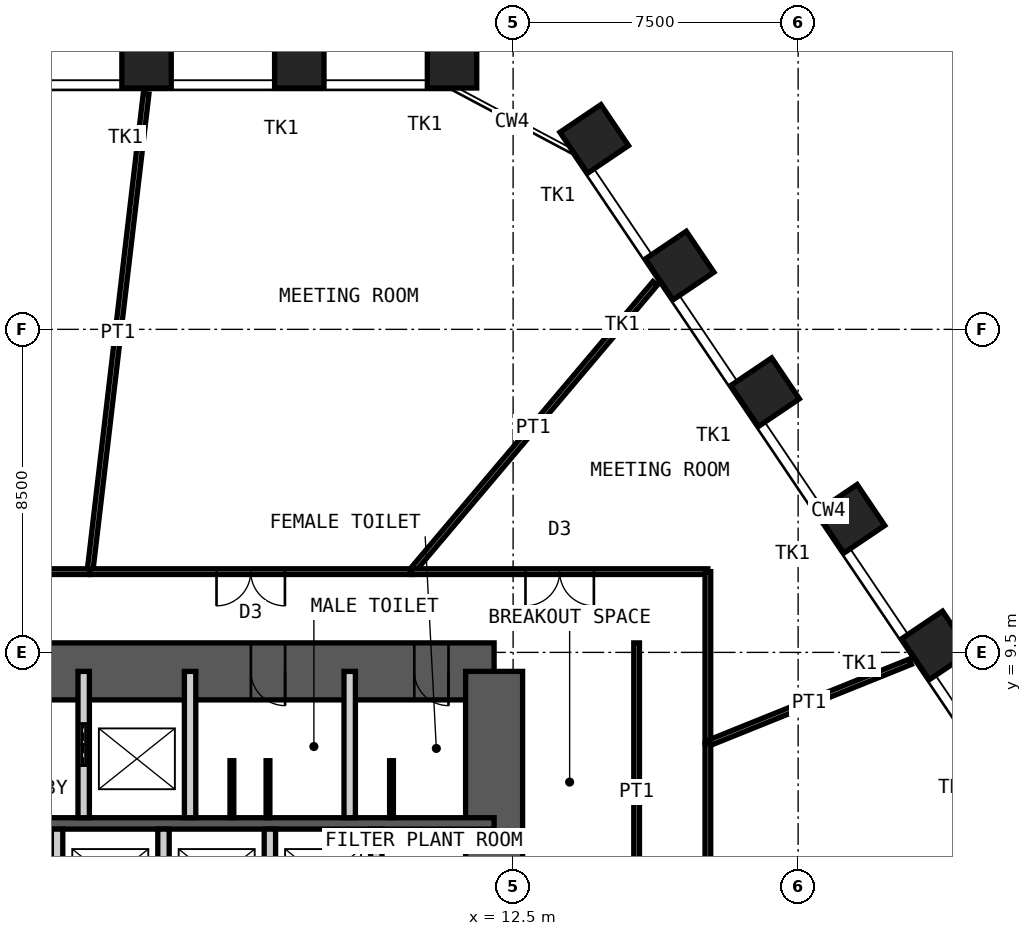
"""IFC4 building model, lengths in metres.
Left out: names, types, materials, properties, quantities, classifications, styles, units other than length and angle.
Written with IfcOpenShell. Run it as: python <this file> out.ifc"""

import sys

from ifc_helpers import new_model, si_unit, direction, frame, frame_2d, origin, origin_2d, place, context, subcontext, project, spatial, rectangle, hollow_rectangle, extrude, element, fill, save


model = new_model("IFC4")
c1 = context("Model", 3, precision=1e-05, world=origin(), true_north=direction((0.0, 1.0)))
c2 = subcontext(c1, "Body", "Model", "MODEL_VIEW")
j1 = project(units=[si_unit("LENGTHUNIT", "METRE"), si_unit("PLANEANGLEUNIT", "RADIAN")], contexts=[c1])
p1 = place(None, origin())
s1 = spatial("IfcSite", under=j1, at=p1, CompositionType="ELEMENT")
p2 = place(p1, origin())
s2 = spatial("IfcBuilding", under=s1, at=p2, CompositionType="ELEMENT")
p3 = place(p2, frame((0.0, 0.0, 170.2)))
s3 = spatial("IfcBuildingStorey", under=s2, at=p3, CompositionType="ELEMENT", Elevation=170.2)
for number, where, z_axis, x_axis in (
    (1, (2.854, 25.0, 0.0), (0.0, 0.0, 1.0), (-1.0, 0.0, 0.0)),
    (2, (6.874, 25.0, 0.0), (0.0, 0.0, 1.0), (-1.0, 0.0, 0.0)),
    (3, (10.893, 25.0, 0.0), (0.0, 0.0, 1.0), (-1.0, 0.0, 0.0)),
    (4, (14.635, 23.01, 0.0), (0.0, 0.0, 1.0), (-0.559, 0.829, 0.0)),
    (5, (16.882, 19.678, 0.0), (0.0, 0.0, 1.0), (-0.559, 0.829, 0.0)),
    (6, (19.13, 16.346, 0.0), (0.0, 0.0, 1.0), (-0.559, 0.829, 0.0)),
    (7, (21.377, 13.014, 0.0), (0.0, 0.0, 1.0), (-0.559, 0.829, 0.0)),
    (8, (23.625, 9.682, 0.0), (0.0, 0.0, 1.0), (-0.559, 0.829, 0.0)),
):
    element("IfcColumn", number, at=place(p3, frame(where, z_axis=z_axis, x_axis=x_axis)), inside=s3, PredefinedType="COLUMN", context=c2, shape_type="SweptSolid", body=[
        extrude(hollow_rectangle(XDim=1.3, YDim=1.3, WallThickness=0.1, at=origin_2d()), origin(), (0.0, 0.0, 1.0), 4.2),
    ])
p4 = place(p3, frame((-12.0, 9.0, 0.0), z_axis=(0.0, 0.0, 1.0), x_axis=(1.0, 0.0, 0.0)))
e9 = element("IfcWall", 9, at=p4, inside=s3, PredefinedType="SHEAR", context=c2, shape_type="SweptSolid", body=[
    extrude(rectangle(XDim=24.0, YDim=1.5, at=frame_2d((12.0, 0.0))), origin(), (0.0, 0.0, 1.0), 4.2),
])
p5 = place(p4, frame((10.4, 0.0, 0.0)))
e10 = element("IfcOpeningElement", 10, at=p5, cuts=e9, PredefinedType="OPENING", context=c2, shape_type="SweptSolid", body=[
    extrude(rectangle(XDim=1.0, YDim=2.1, at=frame_2d((0.5, 1.05))), frame((0.0, 0.76, 0.0), z_axis=(0.0, -1.0, 0.0), x_axis=(1.0, 0.0, 0.0)), (0.0, 0.0, 1.0), 1.52),
])
p6 = place(p4, frame((17.6, 0.0, 0.0)))
e11 = element("IfcOpeningElement", 11, at=p6, cuts=e9, PredefinedType="OPENING", context=c2, shape_type="SweptSolid", body=[
    extrude(rectangle(XDim=0.9, YDim=2.1, at=frame_2d((0.45, 1.05))), frame((0.0, 0.76, 0.0), z_axis=(0.0, -1.0, 0.0), x_axis=(1.0, 0.0, 0.0)), (0.0, 0.0, 1.0), 1.52),
])
p7 = place(p4, frame((21.9, 0.0, 0.0)))
e12 = element("IfcOpeningElement", 12, at=p7, cuts=e9, PredefinedType="OPENING", context=c2, shape_type="SweptSolid", body=[
    extrude(rectangle(XDim=0.9, YDim=2.1, at=frame_2d((0.45, 1.05))), frame((0.0, 0.76, 0.0), z_axis=(0.0, -1.0, 0.0), x_axis=(1.0, 0.0, 0.0)), (0.0, 0.0, 1.0), 1.52),
])
p8 = place(p3, frame((12.0, -9.0, 0.0), z_axis=(0.0, 0.0, 1.0), x_axis=(0.0, 1.0, 0.0)))
e13 = element("IfcWall", 13, at=p8, inside=s3, PredefinedType="SHEAR", context=c2, shape_type="SweptSolid", body=[
    extrude(rectangle(XDim=18.0, YDim=1.5, at=frame_2d((9.0, 0.0))), origin(), (0.0, 0.0, 1.0), 4.2),
])
p9 = place(p8, frame((8.1, 0.0, 0.0)))
e14 = element("IfcOpeningElement", 14, at=p9, cuts=e13, PredefinedType="OPENING", context=c2, shape_type="SweptSolid", body=[
    extrude(rectangle(XDim=1.8, YDim=2.1, at=frame_2d((0.9, 1.05))), frame((0.0, 0.76, 0.0), z_axis=(0.0, -1.0, 0.0), x_axis=(1.0, 0.0, 0.0)), (0.0, 0.0, 1.0), 1.52),
])
p10 = place(p3, frame((-12.0, 5.0, 0.0), z_axis=(0.0, 0.0, 1.0), x_axis=(1.0, 0.0, 0.0)))
e15 = element("IfcWall", 15, at=p10, inside=s3, PredefinedType="SHEAR", context=c2, shape_type="SweptSolid", body=[
    extrude(rectangle(XDim=24.0, YDim=0.3, at=frame_2d((12.0, 0.0))), origin(), (0.0, 0.0, 1.0), 4.2),
])
p11 = place(p3, frame((1.2, 5.15, 0.0), z_axis=(0.0, 0.0, 1.0), x_axis=(0.0, 1.0, 0.0)))
e16 = element("IfcWall", 16, at=p11, inside=s3, PredefinedType="PARTITIONING", context=c2, shape_type="SweptSolid", body=[
    extrude(rectangle(XDim=3.85, YDim=0.3, at=frame_2d((1.925, 0.0))), origin(), (0.0, 0.0, 1.0), 3.98),
])
p12 = place(p11, frame((1.375, 0.0, 0.0)))
e17 = element("IfcOpeningElement", 17, at=p12, cuts=e16, PredefinedType="OPENING", context=c2, shape_type="SweptSolid", body=[
    extrude(rectangle(XDim=1.1, YDim=2.4, at=frame_2d((0.55, 1.2))), frame((0.0, 0.16, 0.0), z_axis=(0.0, -1.0, 0.0), x_axis=(1.0, 0.0, 0.0)), (0.0, 0.0, 1.0), 0.32),
])
for number, where, z_axis, x_axis in (
    (18, (4.0, 5.15, 0.0), (0.0, 0.0, 1.0), (0.0, 1.0, 0.0)),
    (19, (8.2, 5.15, 0.0), (0.0, 0.0, 1.0), (0.0, 1.0, 0.0)),
):
    element("IfcWall", number, at=place(p3, frame(where, z_axis=z_axis, x_axis=x_axis)), inside=s3, PredefinedType="PARTITIONING", context=c2, shape_type="SweptSolid", body=[
        extrude(rectangle(XDim=3.85, YDim=0.3, at=frame_2d((1.925, 0.0))), origin(), (0.0, 0.0, 1.0), 3.98),
    ])
for number, where, z_axis, x_axis in (
    (20, (0.5, 2.2, 0.0), (0.0, 0.0, 1.0), (0.0, 1.0, 0.0)),
    (21, (3.3, 2.2, 0.0), (0.0, 0.0, 1.0), (0.0, 1.0, 0.0)),
    (22, (6.1, 2.2, 0.0), (0.0, 0.0, 1.0), (0.0, 1.0, 0.0)),
    (23, (8.9, 2.2, 0.0), (0.0, 0.0, 1.0), (0.0, 1.0, 0.0)),
):
    element("IfcWall", number, at=place(p3, frame(where, z_axis=z_axis, x_axis=x_axis)), inside=s3, PredefinedType="PARTITIONING", context=c2, shape_type="SweptSolid", body=[
        extrude(rectangle(XDim=2.65, YDim=0.3, at=frame_2d((1.325, 0.0))), origin(), (0.0, 0.0, 1.0), 3.98),
    ])
for number, where, z_axis, x_axis in (
    (24, (5.1, 5.15, 0.0), (0.0, 0.0, 1.0), (0.0, 1.0, 0.0)),
    (25, (6.05, 5.15, 0.0), (0.0, 0.0, 1.0), (0.0, 1.0, 0.0)),
    (26, (9.3, 5.15, 0.0), (0.0, 0.0, 1.0), (0.0, 1.0, 0.0)),
):
    element("IfcWall", number, at=place(p3, frame(where, z_axis=z_axis, x_axis=x_axis)), inside=s3, PredefinedType="PARTITIONING", context=c2, shape_type="SweptSolid", body=[
        extrude(rectangle(XDim=1.5, YDim=0.1, at=frame_2d((0.75, 0.0))), origin(), (0.0, 0.0, 1.0), 2.1),
    ])
p13 = place(p3, frame((2.843, 24.201, 0.0), z_axis=(0.0, 0.0, 1.0), x_axis=(-0.116670084723, -0.993170726175, 0.0)))
e27 = element("IfcWall", 27, at=p13, inside=s3, PredefinedType="PARTITIONING", context=c2, shape_type="SweptSolid", body=[
    extrude(rectangle(XDim=12.662, YDim=0.15, at=frame_2d((6.331, 0.0))), origin(), (0.0, 0.0, 1.0), 2.72),
])
p14 = place(p3, frame((1.366, 11.625, 0.0), z_axis=(0.0, 0.0, 1.0), x_axis=(1.0, 0.0, 0.0)))
e28 = element("IfcWall", 28, at=p14, inside=s3, PredefinedType="PARTITIONING", context=c2, shape_type="SweptSolid", body=[
    extrude(rectangle(XDim=8.46, YDim=0.15, at=frame_2d((4.23, 0.0))), origin(), (0.0, 0.0, 1.0), 3.92),
])
p15 = place(p14, frame((3.33, 0.0, 0.0)))
e29 = element("IfcOpeningElement", 29, at=p15, cuts=e28, PredefinedType="OPENING", context=c2, shape_type="SweptSolid", body=[
    extrude(rectangle(XDim=1.8, YDim=2.4, at=frame_2d((0.9, 1.2))), frame((0.0, 0.085, 0.0), z_axis=(0.0, -1.0, 0.0), x_axis=(1.0, 0.0, 0.0)), (0.0, 0.0, 1.0), 0.17),
])
p16 = place(p3, frame((16.237, 19.21, 0.0), z_axis=(0.0, 0.0, 1.0), x_axis=(-0.645526723652, -0.763737683404, 0.0)))
e30 = element("IfcWall", 30, at=p16, inside=s3, PredefinedType="PARTITIONING", context=c2, shape_type="SweptSolid", body=[
    extrude(rectangle(XDim=9.932, YDim=0.15, at=frame_2d((4.966, 0.0))), origin(), (0.0, 0.0, 1.0), 2.72),
])
p17 = place(p3, frame((9.826, 11.625, 0.0), z_axis=(0.0, 0.0, 1.0), x_axis=(1.0, 0.0, 0.0)))
e31 = element("IfcWall", 31, at=p17, inside=s3, PredefinedType="PARTITIONING", context=c2, shape_type="SweptSolid", body=[
    extrude(rectangle(XDim=7.799, YDim=0.15, at=frame_2d((3.899, 0.0))), origin(), (0.0, 0.0, 1.0), 3.92),
])
p18 = place(p17, frame((3.0, 0.0, 0.0)))
e32 = element("IfcOpeningElement", 32, at=p18, cuts=e31, PredefinedType="OPENING", context=c2, shape_type="SweptSolid", body=[
    extrude(rectangle(XDim=1.8, YDim=2.4, at=frame_2d((0.9, 1.2))), frame((0.0, 0.085, 0.0), z_axis=(0.0, -1.0, 0.0), x_axis=(1.0, 0.0, 0.0)), (0.0, 0.0, 1.0), 0.17),
])
p19 = place(p3, frame((17.625, 11.625, 0.0), z_axis=(0.0, 0.0, 1.0), x_axis=(0.0, -1.0, 0.0)))
e33 = element("IfcWall", 33, at=p19, inside=s3, PredefinedType="PARTITIONING", context=c2, shape_type="SweptSolid", body=[
    extrude(rectangle(XDim=4.519, YDim=0.15, at=frame_2d((2.26, 0.0))), origin(), (0.0, 0.0, 1.0), 3.92),
])
p20 = place(p3, frame((22.951, 9.254, 0.0), z_axis=(0.0, 0.0, 1.0), x_axis=(-0.927444087873, -0.373961848147, 0.0)))
e34 = element("IfcWall", 34, at=p20, inside=s3, PredefinedType="PARTITIONING", context=c2, shape_type="SweptSolid", body=[
    extrude(rectangle(XDim=5.743, YDim=0.15, at=frame_2d((2.872, 0.0))), origin(), (0.0, 0.0, 1.0), 2.72),
])
p21 = place(p3, frame((17.625, 7.106, 0.0), z_axis=(0.0, 0.0, 1.0), x_axis=(0.0, -1.0, 0.0)))
e35 = element("IfcWall", 35, at=p21, inside=s3, PredefinedType="PARTITIONING", context=c2, shape_type="SweptSolid", body=[
    extrude(rectangle(XDim=18.731, YDim=0.15, at=frame_2d((9.365, 0.0))), origin(), (0.0, 0.0, 1.0), 3.92),
])
p22 = place(p21, frame((8.466, 0.0, 0.0)))
e36 = element("IfcOpeningElement", 36, at=p22, cuts=e35, PredefinedType="OPENING", context=c2, shape_type="SweptSolid", body=[
    extrude(rectangle(XDim=1.8, YDim=2.4, at=frame_2d((0.9, 1.2))), frame((0.0, 0.085, 0.0), z_axis=(0.0, -1.0, 0.0), x_axis=(1.0, 0.0, 0.0)), (0.0, 0.0, 1.0), 0.17),
])
p23 = place(p3, frame((-4.403, 11.625, 0.0), z_axis=(0.0, 0.0, 1.0), x_axis=(1.0, 0.0, 0.0)))
e37 = element("IfcWall", 37, at=p23, inside=s3, PredefinedType="PARTITIONING", context=c2, shape_type="SweptSolid", body=[
    extrude(rectangle(XDim=5.768, YDim=0.15, at=frame_2d((2.884, 0.0))), origin(), (0.0, 0.0, 1.0), 3.92),
])
p24 = place(p23, frame((1.984, 0.0, 0.0)))
e38 = element("IfcOpeningElement", 38, at=p24, cuts=e37, PredefinedType="OPENING", context=c2, shape_type="SweptSolid", body=[
    extrude(rectangle(XDim=1.8, YDim=2.4, at=frame_2d((0.9, 1.2))), frame((0.0, 0.085, 0.0), z_axis=(0.0, -1.0, 0.0), x_axis=(1.0, 0.0, 0.0)), (0.0, 0.0, 1.0), 0.17),
])
p25 = place(p3, frame((15.75, 1.9, 0.0), z_axis=(0.0, 0.0, 1.0), x_axis=(0.0, 1.0, 0.0)))
e39 = element("IfcWall", 39, at=p25, inside=s3, PredefinedType="PARTITIONING", context=c2, shape_type="SweptSolid", body=[
    extrude(rectangle(XDim=7.85, YDim=0.15, at=frame_2d((3.925, 0.0))), origin(), (0.0, 0.0, 1.0), 3.92),
])
p26 = place(p6, origin())
e40 = element("IfcDoor", 40, at=p26, inside=s3, OperationType="SINGLE_SWING_RIGHT", PredefinedType="DOOR", context=c2, shape_type="SweptSolid", body=[
    extrude(rectangle(XDim=0.9, YDim=2.1, at=frame_2d((0.45, 1.05))), frame((0.0, 0.025, 0.0), z_axis=(0.0, -1.0, 0.0), x_axis=(1.0, 0.0, 0.0)), (0.0, 0.0, 1.0), 0.05),
])
fill(e11, e40)
p27 = place(p7, origin())
e41 = element("IfcDoor", 41, at=p27, inside=s3, OperationType="SINGLE_SWING_RIGHT", PredefinedType="DOOR", context=c2, shape_type="SweptSolid", body=[
    extrude(rectangle(XDim=0.9, YDim=2.1, at=frame_2d((0.45, 1.05))), frame((0.0, 0.025, 0.0), z_axis=(0.0, -1.0, 0.0), x_axis=(1.0, 0.0, 0.0)), (0.0, 0.0, 1.0), 0.05),
])
fill(e12, e41)
p28 = place(p12, origin())
e42 = element("IfcDoor", 42, at=p28, inside=s3, OperationType="DOUBLE_DOOR_SLIDING", PredefinedType="DOOR", context=c2, shape_type="SweptSolid", body=[
    extrude(rectangle(XDim=1.1, YDim=2.4, at=frame_2d((0.55, 1.2))), frame((0.0, 0.025, 0.0), z_axis=(0.0, -1.0, 0.0), x_axis=(1.0, 0.0, 0.0)), (0.0, 0.0, 1.0), 0.05),
])
fill(e17, e42)
p29 = place(p15, origin())
e43 = element("IfcDoor", 43, at=p29, inside=s3, OperationType="DOUBLE_DOOR_DOUBLE_SWING", PredefinedType="DOOR", context=c2, shape_type="SweptSolid", body=[
    extrude(rectangle(XDim=1.8, YDim=2.4, at=frame_2d((0.9, 1.2))), frame((0.0, 0.025, 0.0), z_axis=(0.0, -1.0, 0.0), x_axis=(1.0, 0.0, 0.0)), (0.0, 0.0, 1.0), 0.05),
])
fill(e29, e43)
p30 = place(p18, origin())
e44 = element("IfcDoor", 44, at=p30, inside=s3, OperationType="DOUBLE_DOOR_DOUBLE_SWING", PredefinedType="DOOR", context=c2, shape_type="SweptSolid", body=[
    extrude(rectangle(XDim=1.8, YDim=2.4, at=frame_2d((0.9, 1.2))), frame((0.0, 0.025, 0.0), z_axis=(0.0, -1.0, 0.0), x_axis=(1.0, 0.0, 0.0)), (0.0, 0.0, 1.0), 0.05),
])
fill(e32, e44)
save(model, sys.argv[1])
